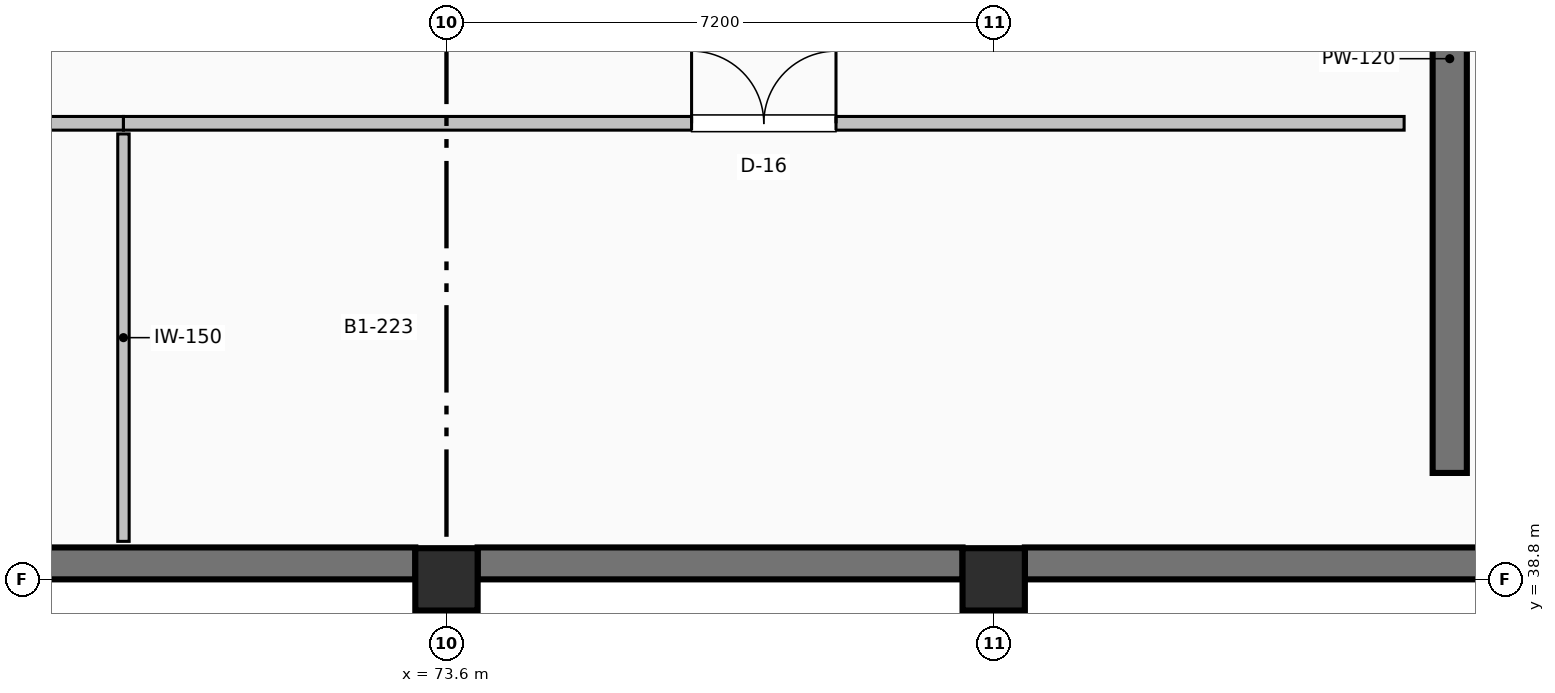
"""IFC4 building model, lengths in metres.
Left out: names, types, materials, properties, quantities, classifications, styles, units other than length and angle.
Written with IfcOpenShell. Run it as: python <this file> out.ifc"""

import sys

from ifc_helpers import new_model, si_unit, direction, frame, frame_2d, origin, origin_2d, place, context, subcontext, project, spatial, rectangle, extrude, element, fill, save


model = new_model("IFC4")
c1 = context("Model", 3, precision=1e-05, world=origin(), true_north=direction((0.0, 1.0)))
c2 = subcontext(c1, "Body", "Model", "MODEL_VIEW")
j1 = project(units=[si_unit("LENGTHUNIT", "METRE"), si_unit("PLANEANGLEUNIT", "RADIAN")], contexts=[c1])
p1 = place(None, origin())
s1 = spatial("IfcSite", under=j1, at=p1, CompositionType="ELEMENT")
p2 = place(p1, origin())
s2 = spatial("IfcBuilding", under=s1, at=p2, CompositionType="ELEMENT")
p3 = place(p2, frame((0.0, 0.0, -4.8)))
s3 = spatial("IfcBuildingStorey", under=s2, at=p3, CompositionType="ELEMENT", Elevation=-4.8)
for number, where, z_axis, x_axis in (
    (1, (73.6, 38.8, 0.0), (0.0, 0.0, 1.0), (1.0, 0.0, 0.0)),
    (2, (80.8, 38.8, 0.0), (0.0, 0.0, 1.0), (1.0, 0.0, 0.0)),
):
    element("IfcColumn", number, at=place(p3, frame(where, z_axis=z_axis, x_axis=x_axis)), inside=s3, PredefinedType="COLUMN", context=c2, shape_type="SweptSolid", body=[
        extrude(rectangle(XDim=0.82, YDim=0.82, at=origin_2d()), origin(), (0.0, 0.0, 1.0), 4.8),
    ])
p4 = place(p3, frame((86.8, 40.2, 0.0), z_axis=(0.0, 0.0, 1.0), x_axis=(0.0, 1.0, 0.0)))
e3 = element("IfcWall", 3, at=p4, inside=s3, PredefinedType="SHEAR", context=c2, shape_type="SweptSolid", body=[
    extrude(rectangle(XDim=14.0, YDim=0.45, at=frame_2d((7.0, 0.0))), origin(), (0.0, 0.0, 1.0), 4.48),
])
p5 = place(p3, frame((87.59, 39.01, 0.0), z_axis=(0.0, 0.0, 1.0), x_axis=(-1.0, 0.0, 0.0)))
e4 = element("IfcWall", 4, at=p5, inside=s3, PredefinedType="SHEAR", context=c2, shape_type="SweptSolid", body=[
    extrude(rectangle(XDim=6.38, YDim=0.42, at=frame_2d((3.19, 0.0))), origin(), (0.0, 0.0, 1.0), 4.5),
])
for number, where, z_axis, x_axis in (
    (5, (80.39, 39.01, 0.0), (0.0, 0.0, 1.0), (-1.0, 0.0, 0.0)),
    (6, (73.19, 39.01, 0.0), (0.0, 0.0, 1.0), (-1.0, 0.0, 0.0)),
):
    element("IfcWall", number, at=place(p3, frame(where, z_axis=z_axis, x_axis=x_axis)), inside=s3, PredefinedType="SHEAR", context=c2, shape_type="SweptSolid", body=[
        extrude(rectangle(XDim=6.38, YDim=0.42, at=frame_2d((3.19, 0.0))), origin(), (0.0, 0.0, 1.0), 4.5),
    ])
p6 = place(p3, frame((52.5, 44.8, 0.0), z_axis=(0.0, 0.0, 1.0), x_axis=(1.0, 0.0, 0.0)))
e7 = element("IfcWall", 7, at=p6, inside=s3, PredefinedType="PARTITIONING", context=c2, shape_type="SweptSolid", body=[
    extrude(rectangle(XDim=16.85, YDim=0.18, at=frame_2d((8.425, 0.0))), origin(), (0.0, 0.0, 1.0), 4.472),
])
p7 = place(p6, frame((7.685, 0.0, 0.0)))
e8 = element("IfcOpeningElement", 8, at=p7, cuts=e7, PredefinedType="OPENING", context=c2, shape_type="SweptSolid", body=[
    extrude(rectangle(XDim=1.48, YDim=2.18, at=frame_2d((0.74, 1.09))), frame((0.0, 0.1, 0.0), z_axis=(0.0, -1.0, 0.0), x_axis=(1.0, 0.0, 0.0)), (0.0, 0.0, 1.0), 0.2),
])
p8 = place(p3, frame((69.35, 39.3, 0.0), z_axis=(0.0, 0.0, 1.0), x_axis=(0.0, 1.0, 0.0)))
e9 = element("IfcWall", 9, at=p8, inside=s3, PredefinedType="PARTITIONING", context=c2, shape_type="SweptSolid", body=[
    extrude(rectangle(XDim=5.36, YDim=0.15, at=frame_2d((2.68, 0.0))), origin(), (0.0, 0.0, 1.0), 4.472),
])
p9 = place(p3, frame((69.35, 44.8, 0.0), z_axis=(0.0, 0.0, 1.0), x_axis=(1.0, 0.0, 0.0)))
e10 = element("IfcWall", 10, at=p9, inside=s3, PredefinedType="PARTITIONING", context=c2, shape_type="SweptSolid", body=[
    extrude(rectangle(XDim=16.85, YDim=0.18, at=frame_2d((8.425, 0.0))), origin(), (0.0, 0.0, 1.0), 4.472),
])
p10 = place(p9, frame((7.475, 0.0, 0.0)))
e11 = element("IfcOpeningElement", 11, at=p10, cuts=e10, PredefinedType="OPENING", context=c2, shape_type="SweptSolid", body=[
    extrude(rectangle(XDim=1.9, YDim=2.26, at=frame_2d((0.95, 1.13))), frame((0.0, 0.1, 0.0), z_axis=(0.0, -1.0, 0.0), x_axis=(1.0, 0.0, 0.0)), (0.0, 0.0, 1.0), 0.2),
])
p11 = place(p10, origin())
e12 = element("IfcDoor", 12, at=p11, inside=s3, OperationType="DOUBLE_DOOR_SINGLE_SWING", PredefinedType="DOOR", context=c2, shape_type="SweptSolid", body=[
    extrude(rectangle(XDim=1.9, YDim=2.26, at=frame_2d((0.95, 1.13))), frame((0.0, 0.025, 0.0), z_axis=(0.0, -1.0, 0.0), x_axis=(1.0, 0.0, 0.0)), (0.0, 0.0, 1.0), 0.05),
])
fill(e11, e12)
save(model, sys.argv[1])
